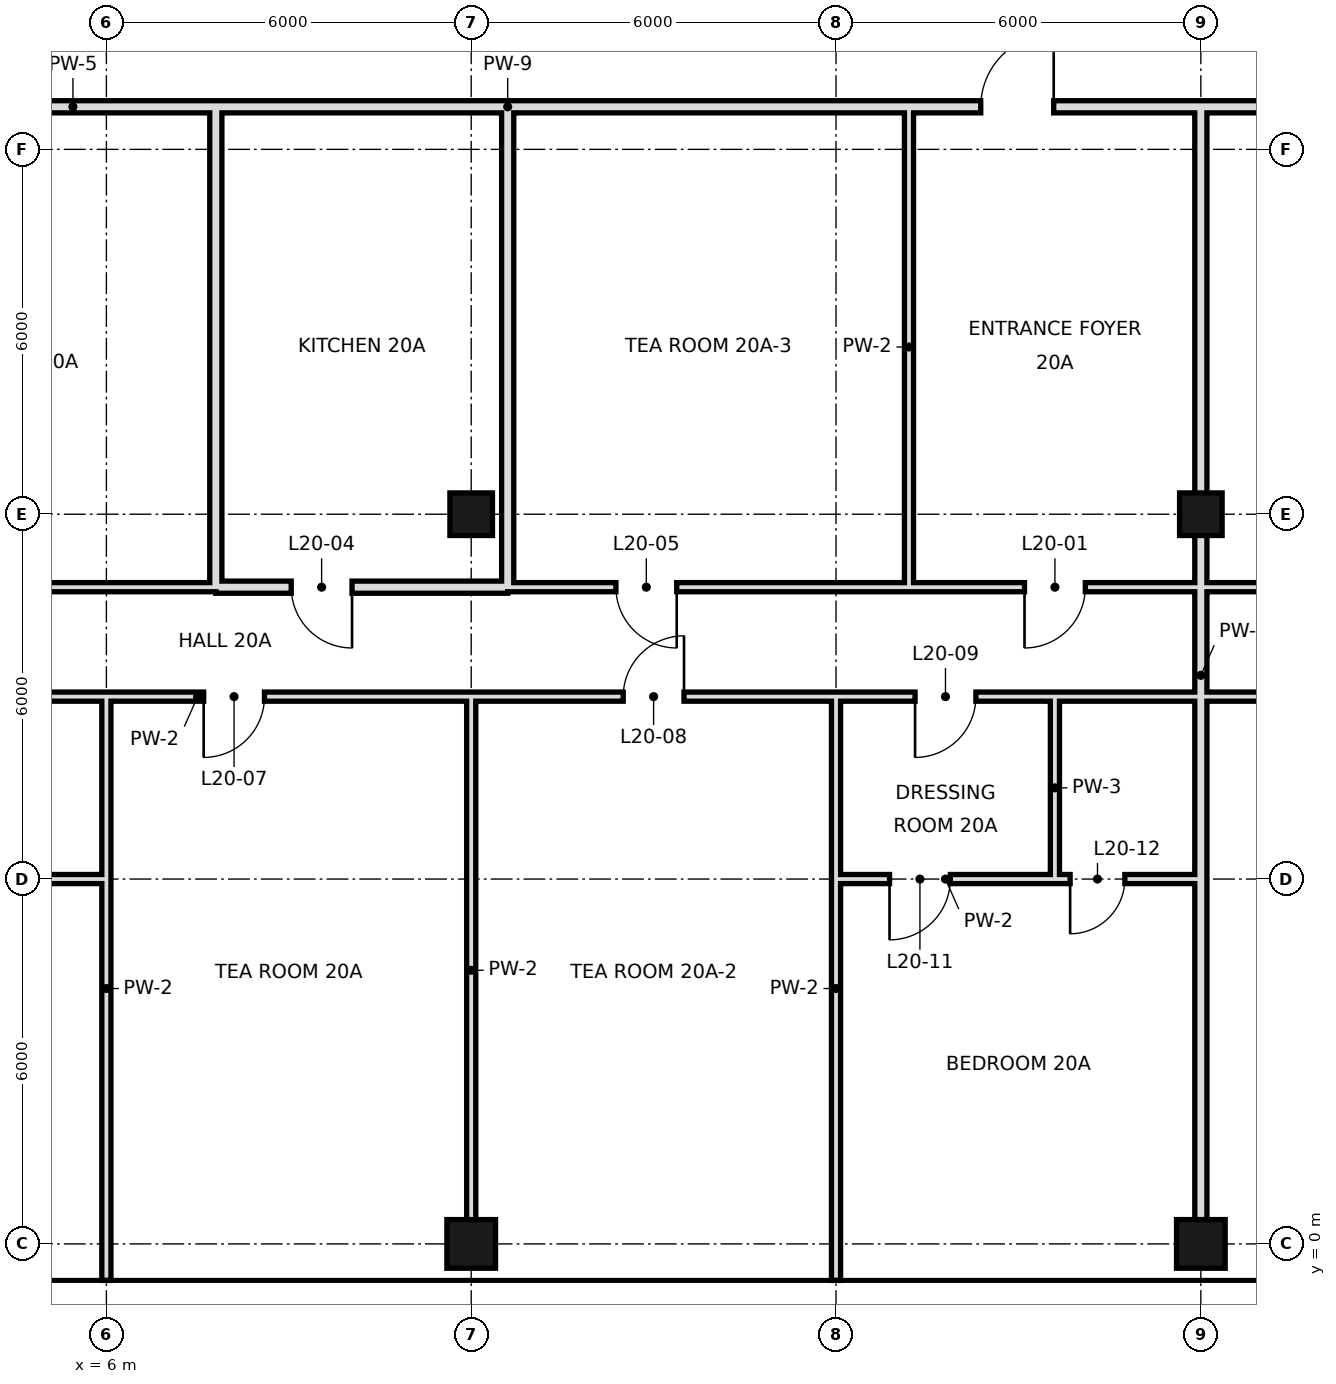
"""IFC4 building model, lengths in metres.
Left out: names, types, materials, properties, quantities, classifications, styles, units other than length and angle.
Written with IfcOpenShell. Run it as: python <this file> out.ifc"""

import sys

from ifc_helpers import new_model, si_unit, direction, frame, frame_2d, origin, origin_2d, place, context, subcontext, project, spatial, rectangle, hollow_rectangle, extrude, element, fill, save


model = new_model("IFC4")
c1 = context("Model", 3, precision=1e-05, world=origin(), true_north=direction((0.0, 1.0)))
c2 = subcontext(c1, "Body", "Model", "MODEL_VIEW")
j1 = project(units=[si_unit("LENGTHUNIT", "METRE"), si_unit("PLANEANGLEUNIT", "RADIAN")], contexts=[c1])
p1 = place(None, origin())
s1 = spatial("IfcSite", under=j1, at=p1, CompositionType="ELEMENT")
p2 = place(p1, origin())
s2 = spatial("IfcBuilding", under=s1, at=p2, CompositionType="ELEMENT")
p3 = place(p2, frame((0.0, 0.0, 96.2)))
s3 = spatial("IfcBuildingStorey", under=s2, at=p3, CompositionType="ELEMENT", Elevation=96.2)
p4 = place(p3, frame((12.0, 0.0, 0.0), z_axis=(0.0, 0.0, 1.0), x_axis=(1.0, 0.0, 0.0)))
e1 = element("IfcColumn", 1, at=p4, inside=s3, PredefinedType="COLUMN", context=c2, shape_type="SweptSolid", body=[
    extrude(hollow_rectangle(XDim=0.8, YDim=0.8, WallThickness=0.04, at=origin_2d()), origin(), (0.0, 0.0, 1.0), 3.6),
])
p5 = place(p3, frame((12.0, 12.0, 0.0), z_axis=(0.0, 0.0, 1.0), x_axis=(1.0, 0.0, 0.0)))
e2 = element("IfcColumn", 2, at=p5, inside=s3, PredefinedType="COLUMN", context=c2, shape_type="SweptSolid", body=[
    extrude(hollow_rectangle(XDim=0.7, YDim=0.7, WallThickness=0.036, at=origin_2d()), origin(), (0.0, 0.0, 1.0), 3.6),
])
p6 = place(p3, frame((24.0, 0.0, 0.0), z_axis=(0.0, 0.0, 1.0), x_axis=(1.0, 0.0, 0.0)))
e3 = element("IfcColumn", 3, at=p6, inside=s3, PredefinedType="COLUMN", context=c2, shape_type="SweptSolid", body=[
    extrude(hollow_rectangle(XDim=0.8, YDim=0.8, WallThickness=0.04, at=origin_2d()), origin(), (0.0, 0.0, 1.0), 3.6),
])
p7 = place(p3, frame((24.0, 12.0, 0.0), z_axis=(0.0, 0.0, 1.0), x_axis=(1.0, 0.0, 0.0)))
e4 = element("IfcColumn", 4, at=p7, inside=s3, PredefinedType="COLUMN", context=c2, shape_type="SweptSolid", body=[
    extrude(hollow_rectangle(XDim=0.7, YDim=0.7, WallThickness=0.036, at=origin_2d()), origin(), (0.0, 0.0, 1.0), 3.6),
])
p8 = place(p3, frame((12.0, 0.0, 0.0), z_axis=(0.0, 0.0, 1.0), x_axis=(0.0, 1.0, 0.0)))
e5 = element("IfcWall", 5, at=p8, inside=s3, PredefinedType="PARTITIONING", context=c2, shape_type="SweptSolid", body=[
    extrude(rectangle(XDim=9.0, YDim=0.15, at=frame_2d((4.5, 0.0))), origin(), (0.0, 0.0, 1.0), 2.72),
])
p9 = place(p3, frame((12.6, 10.8, 0.0), z_axis=(0.0, 0.0, 1.0), x_axis=(0.0, 1.0, 0.0)))
e6 = element("IfcWall", 6, at=p9, inside=s3, PredefinedType="SOLIDWALL", context=c2, shape_type="SweptSolid", body=[
    extrude(rectangle(XDim=7.9, YDim=0.2, at=frame_2d((3.95, 0.0))), origin(), (0.0, 0.0, 1.0), 2.72),
])
p10 = place(p3, frame((18.0, -0.6, 0.0), z_axis=(0.0, 0.0, 1.0), x_axis=(0.0, 1.0, 0.0)))
e7 = element("IfcWall", 7, at=p10, inside=s3, PredefinedType="PARTITIONING", context=c2, shape_type="SweptSolid", body=[
    extrude(rectangle(XDim=9.6, YDim=0.15, at=frame_2d((4.8, 0.0))), origin(), (0.0, 0.0, 1.0), 2.72),
])
p11 = place(p3, frame((19.2, 10.8, 0.0), z_axis=(0.0, 0.0, 1.0), x_axis=(0.0, 1.0, 0.0)))
e8 = element("IfcWall", 8, at=p11, inside=s3, PredefinedType="PARTITIONING", context=c2, shape_type="SweptSolid", body=[
    extrude(rectangle(XDim=7.9, YDim=0.15, at=frame_2d((3.95, 0.0))), origin(), (0.0, 0.0, 1.0), 3.42),
])
p12 = place(p3, frame((21.6, 6.0, 0.0), z_axis=(0.0, 0.0, 1.0), x_axis=(0.0, 1.0, 0.0)))
e9 = element("IfcWall", 9, at=p12, inside=s3, PredefinedType="PARTITIONING", context=c2, shape_type="SweptSolid", body=[
    extrude(rectangle(XDim=3.0, YDim=0.15, at=frame_2d((1.5, 0.0))), origin(), (0.0, 0.0, 1.0), 3.42),
])
p13 = place(p3, frame((24.0, 0.0, 0.0), z_axis=(0.0, 0.0, 1.0), x_axis=(0.0, 1.0, 0.0)))
e10 = element("IfcWall", 10, at=p13, inside=s3, PredefinedType="SOLIDWALL", context=c2, shape_type="SweptSolid", body=[
    extrude(rectangle(XDim=18.7, YDim=0.2, at=frame_2d((9.35, 0.0))), origin(), (0.0, 0.0, 1.0), 2.72),
])
p14 = place(p3, frame((6.0, -0.6, 0.0), z_axis=(0.0, 0.0, 1.0), x_axis=(0.0, 1.0, 0.0)))
e11 = element("IfcWall", 11, at=p14, inside=s3, PredefinedType="PARTITIONING", context=c2, shape_type="SweptSolid", body=[
    extrude(rectangle(XDim=9.6, YDim=0.15, at=frame_2d((4.8, 0.0))), origin(), (0.0, 0.0, 1.0), 2.72),
])
p15 = place(p3, frame((7.8, 10.8, 0.0), z_axis=(0.0, 0.0, 1.0), x_axis=(0.0, 1.0, 0.0)))
e12 = element("IfcWall", 12, at=p15, inside=s3, PredefinedType="SOLIDWALL", context=c2, shape_type="SweptSolid", body=[
    extrude(rectangle(XDim=7.9, YDim=0.2, at=frame_2d((3.95, 0.0))), origin(), (0.0, 0.0, 1.0), 2.72),
])
p16 = place(p3, frame((7.8, 10.8, 0.0), z_axis=(0.0, 0.0, 1.0), x_axis=(1.0, 0.0, 0.0)))
e13 = element("IfcWall", 13, at=p16, inside=s3, PredefinedType="SOLIDWALL", context=c2, shape_type="SweptSolid", body=[
    extrude(rectangle(XDim=4.8, YDim=0.2, at=frame_2d((2.4, 0.0))), origin(), (0.0, 0.0, 1.0), 2.72),
])
p17 = place(p16, frame((1.24, 0.0, 0.0)))
e14 = element("IfcOpeningElement", 14, at=p17, cuts=e13, PredefinedType="OPENING", context=c2, shape_type="SweptSolid", body=[
    extrude(rectangle(XDim=1.0, YDim=2.4, at=frame_2d((0.5, 1.2))), frame((0.0, 0.11, 0.0), z_axis=(0.0, -1.0, 0.0), x_axis=(1.0, 0.0, 0.0)), (0.0, 0.0, 1.0), 0.22),
])
p18 = place(p3, frame((-3.6, 10.8, 0.0), z_axis=(0.0, 0.0, 1.0), x_axis=(1.0, 0.0, 0.0)))
e15 = element("IfcWall", 15, at=p18, inside=s3, PredefinedType="PARTITIONING", context=c2, shape_type="SweptSolid", body=[
    extrude(rectangle(XDim=11.4, YDim=0.15, at=frame_2d((5.7, 0.0))), origin(), (0.0, 0.0, 1.0), 3.42),
])
p19 = place(p18, frame((7.18, 0.0, 0.0)))
e16 = element("IfcOpeningElement", 16, at=p19, cuts=e15, PredefinedType="OPENING", context=c2, shape_type="SweptSolid", body=[
    extrude(rectangle(XDim=1.0, YDim=2.4, at=frame_2d((0.5, 1.2))), frame((0.0, 0.085, 0.0), z_axis=(0.0, -1.0, 0.0), x_axis=(1.0, 0.0, 0.0)), (0.0, 0.0, 1.0), 0.17),
])
p20 = place(p3, frame((12.6, 10.8, 0.0), z_axis=(0.0, 0.0, 1.0), x_axis=(1.0, 0.0, 0.0)))
e17 = element("IfcWall", 17, at=p20, inside=s3, PredefinedType="PARTITIONING", context=c2, shape_type="SweptSolid", body=[
    extrude(rectangle(XDim=40.2, YDim=0.15, at=frame_2d((20.1, 0.0))), origin(), (0.0, 0.0, 1.0), 3.42),
])
p21 = place(p20, frame((8.5, 0.0, 0.0)))
e18 = element("IfcOpeningElement", 18, at=p21, cuts=e17, PredefinedType="OPENING", context=c2, shape_type="SweptSolid", body=[
    extrude(rectangle(XDim=1.0, YDim=2.4, at=frame_2d((0.5, 1.2))), frame((0.0, 0.085, 0.0), z_axis=(0.0, -1.0, 0.0), x_axis=(1.0, 0.0, 0.0)), (0.0, 0.0, 1.0), 0.17),
])
p22 = place(p20, frame((1.78, 0.0, 0.0)))
e19 = element("IfcOpeningElement", 19, at=p22, cuts=e17, PredefinedType="OPENING", context=c2, shape_type="SweptSolid", body=[
    extrude(rectangle(XDim=1.0, YDim=2.4, at=frame_2d((0.5, 1.2))), frame((0.0, 0.085, 0.0), z_axis=(0.0, -1.0, 0.0), x_axis=(1.0, 0.0, 0.0)), (0.0, 0.0, 1.0), 0.17),
])
p23 = place(p20, frame((23.8, 0.0, 0.0)))
e20 = element("IfcOpeningElement", 20, at=p23, cuts=e17, PredefinedType="OPENING", context=c2, shape_type="SweptSolid", body=[
    extrude(rectangle(XDim=1.0, YDim=2.4, at=frame_2d((0.5, 1.2))), frame((0.0, 0.085, 0.0), z_axis=(0.0, -1.0, 0.0), x_axis=(1.0, 0.0, 0.0)), (0.0, 0.0, 1.0), 0.17),
])
p24 = place(p20, frame((16.3, 0.0, 0.0)))
e21 = element("IfcOpeningElement", 21, at=p24, cuts=e17, PredefinedType="OPENING", context=c2, shape_type="SweptSolid", body=[
    extrude(rectangle(XDim=1.0, YDim=2.4, at=frame_2d((0.5, 1.2))), frame((0.0, 0.085, 0.0), z_axis=(0.0, -1.0, 0.0), x_axis=(1.0, 0.0, 0.0)), (0.0, 0.0, 1.0), 0.17),
])
p25 = place(p20, frame((33.7, 0.0, 0.0)))
e22 = element("IfcOpeningElement", 22, at=p25, cuts=e17, PredefinedType="OPENING", context=c2, shape_type="SweptSolid", body=[
    extrude(rectangle(XDim=1.0, YDim=2.4, at=frame_2d((0.5, 1.2))), frame((0.0, 0.085, 0.0), z_axis=(0.0, -1.0, 0.0), x_axis=(1.0, 0.0, 0.0)), (0.0, 0.0, 1.0), 0.17),
])
p26 = place(p3, frame((3.1, 18.7, 0.0), z_axis=(0.0, 0.0, 1.0), x_axis=(1.0, 0.0, 0.0)))
e23 = element("IfcWall", 23, at=p26, inside=s3, PredefinedType="SOLIDWALL", context=c2, shape_type="SweptSolid", body=[
    extrude(rectangle(XDim=4.7, YDim=0.2, at=frame_2d((2.35, 0.0))), origin(), (0.0, 0.0, 1.0), 2.72),
])
p27 = place(p3, frame((12.6, 18.7, 0.0), z_axis=(0.0, 0.0, 1.0), x_axis=(1.0, 0.0, 0.0)))
e24 = element("IfcWall", 24, at=p27, inside=s3, PredefinedType="SOLIDWALL", context=c2, shape_type="SweptSolid", body=[
    extrude(rectangle(XDim=32.3, YDim=0.2, at=frame_2d((16.15, 0.0))), origin(), (0.0, 0.0, 1.0), 2.72),
])
p28 = place(p27, frame((7.78, 0.0, 0.0)))
e25 = element("IfcOpeningElement", 25, at=p28, cuts=e24, PredefinedType="OPENING", context=c2, shape_type="SweptSolid", body=[
    extrude(rectangle(XDim=1.2, YDim=2.4, at=frame_2d((0.6, 1.2))), frame((0.0, 0.11, 0.0), z_axis=(0.0, -1.0, 0.0), x_axis=(1.0, 0.0, 0.0)), (0.0, 0.0, 1.0), 0.22),
])
p29 = place(p27, frame((24.6, 0.0, 0.0)))
e26 = element("IfcOpeningElement", 26, at=p29, cuts=e24, PredefinedType="OPENING", context=c2, shape_type="SweptSolid", body=[
    extrude(rectangle(XDim=1.2, YDim=2.4, at=frame_2d((0.6, 1.2))), frame((0.0, 0.11, 0.0), z_axis=(0.0, -1.0, 0.0), x_axis=(1.0, 0.0, 0.0)), (0.0, 0.0, 1.0), 0.22),
])
p30 = place(p3, frame((7.8, 18.7, 0.0), z_axis=(0.0, 0.0, 1.0), x_axis=(1.0, 0.0, 0.0)))
e27 = element("IfcWall", 27, at=p30, inside=s3, PredefinedType="SOLIDWALL", context=c2, shape_type="SweptSolid", body=[
    extrude(rectangle(XDim=4.8, YDim=0.2, at=frame_2d((2.4, 0.0))), origin(), (0.0, 0.0, 1.0), 3.42),
])
p31 = place(p3, frame((-6.0, 6.0, 0.0), z_axis=(0.0, 0.0, 1.0), x_axis=(1.0, 0.0, 0.0)))
e28 = element("IfcWall", 28, at=p31, inside=s3, PredefinedType="PARTITIONING", context=c2, shape_type="SweptSolid", body=[
    extrude(rectangle(XDim=12.0, YDim=0.15, at=frame_2d((6.0, 0.0))), origin(), (0.0, 0.0, 1.0), 2.97),
])
p32 = place(p31, frame((5.1, 0.0, 0.0)))
e29 = element("IfcOpeningElement", 29, at=p32, cuts=e28, PredefinedType="OPENING", context=c2, shape_type="SweptSolid", body=[
    extrude(rectangle(XDim=1.8, YDim=2.4, at=frame_2d((0.9, 1.2))), frame((0.0, 0.085, 0.0), z_axis=(0.0, -1.0, 0.0), x_axis=(1.0, 0.0, 0.0)), (0.0, 0.0, 1.0), 0.17),
])
p33 = place(p3, frame((18.0, 6.0, 0.0), z_axis=(0.0, 0.0, 1.0), x_axis=(1.0, 0.0, 0.0)))
e30 = element("IfcWall", 30, at=p33, inside=s3, PredefinedType="PARTITIONING", context=c2, shape_type="SweptSolid", body=[
    extrude(rectangle(XDim=3.6, YDim=0.15, at=frame_2d((1.8, 0.0))), origin(), (0.0, 0.0, 1.0), 2.97),
])
p34 = place(p33, frame((0.88, 0.0, 0.0)))
e31 = element("IfcOpeningElement", 31, at=p34, cuts=e30, PredefinedType="OPENING", context=c2, shape_type="SweptSolid", body=[
    extrude(rectangle(XDim=1.0, YDim=2.4, at=frame_2d((0.5, 1.2))), frame((0.0, 0.085, 0.0), z_axis=(0.0, -1.0, 0.0), x_axis=(1.0, 0.0, 0.0)), (0.0, 0.0, 1.0), 0.17),
])
p35 = place(p3, frame((21.6, 6.0, 0.0), z_axis=(0.0, 0.0, 1.0), x_axis=(1.0, 0.0, 0.0)))
e32 = element("IfcWall", 32, at=p35, inside=s3, PredefinedType="PARTITIONING", context=c2, shape_type="SweptSolid", body=[
    extrude(rectangle(XDim=2.4, YDim=0.15, at=frame_2d((1.2, 0.0))), origin(), (0.0, 0.0, 1.0), 2.97),
])
p36 = place(p35, frame((0.25, 0.0, 0.0)))
e33 = element("IfcOpeningElement", 33, at=p36, cuts=e32, PredefinedType="OPENING", context=c2, shape_type="SweptSolid", body=[
    extrude(rectangle(XDim=0.9, YDim=2.4, at=frame_2d((0.45, 1.2))), frame((0.0, 0.085, 0.0), z_axis=(0.0, -1.0, 0.0), x_axis=(1.0, 0.0, 0.0)), (0.0, 0.0, 1.0), 0.17),
])
p37 = place(p3, frame((-6.6, 9.0, 0.0), z_axis=(0.0, 0.0, 1.0), x_axis=(1.0, 0.0, 0.0)))
e34 = element("IfcWall", 34, at=p37, inside=s3, PredefinedType="PARTITIONING", context=c2, shape_type="SweptSolid", body=[
    extrude(rectangle(XDim=28.2, YDim=0.15, at=frame_2d((14.1, 0.0))), origin(), (0.0, 0.0, 1.0), 3.42),
])
p38 = place(p37, frame((7.64, 0.0, 0.0)))
e35 = element("IfcOpeningElement", 35, at=p38, cuts=e34, PredefinedType="OPENING", context=c2, shape_type="SweptSolid", body=[
    extrude(rectangle(XDim=1.8, YDim=2.4, at=frame_2d((0.9, 1.2))), frame((0.0, 0.085, 0.0), z_axis=(0.0, -1.0, 0.0), x_axis=(1.0, 0.0, 0.0)), (0.0, 0.0, 1.0), 0.17),
])
p39 = place(p37, frame((14.2, 0.0, 0.0)))
e36 = element("IfcOpeningElement", 36, at=p39, cuts=e34, PredefinedType="OPENING", context=c2, shape_type="SweptSolid", body=[
    extrude(rectangle(XDim=1.0, YDim=2.4, at=frame_2d((0.5, 1.2))), frame((0.0, 0.085, 0.0), z_axis=(0.0, -1.0, 0.0), x_axis=(1.0, 0.0, 0.0)), (0.0, 0.0, 1.0), 0.17),
])
p40 = place(p37, frame((21.1, 0.0, 0.0)))
e37 = element("IfcOpeningElement", 37, at=p40, cuts=e34, PredefinedType="OPENING", context=c2, shape_type="SweptSolid", body=[
    extrude(rectangle(XDim=1.0, YDim=2.4, at=frame_2d((0.5, 1.2))), frame((0.0, 0.085, 0.0), z_axis=(0.0, -1.0, 0.0), x_axis=(1.0, 0.0, 0.0)), (0.0, 0.0, 1.0), 0.17),
])
p41 = place(p37, frame((25.9, 0.0, 0.0)))
e38 = element("IfcOpeningElement", 38, at=p41, cuts=e34, PredefinedType="OPENING", context=c2, shape_type="SweptSolid", body=[
    extrude(rectangle(XDim=1.0, YDim=2.4, at=frame_2d((0.5, 1.2))), frame((0.0, 0.085, 0.0), z_axis=(0.0, -1.0, 0.0), x_axis=(1.0, 0.0, 0.0)), (0.0, 0.0, 1.0), 0.17),
])
p42 = place(p3, frame((24.0, 9.0, 0.0), z_axis=(0.0, 0.0, 1.0), x_axis=(1.0, 0.0, 0.0)))
e39 = element("IfcWall", 39, at=p42, inside=s3, PredefinedType="PARTITIONING", context=c2, shape_type="SweptSolid", body=[
    extrude(rectangle(XDim=18.0, YDim=0.15, at=frame_2d((9.0, 0.0))), origin(), (0.0, 0.0, 1.0), 3.42),
])
p43 = place(p42, frame((2.1, 0.0, 0.0)))
e40 = element("IfcOpeningElement", 40, at=p43, cuts=e39, PredefinedType="OPENING", context=c2, shape_type="SweptSolid", body=[
    extrude(rectangle(XDim=1.8, YDim=2.4, at=frame_2d((0.9, 1.2))), frame((0.0, 0.085, 0.0), z_axis=(0.0, -1.0, 0.0), x_axis=(1.0, 0.0, 0.0)), (0.0, 0.0, 1.0), 0.17),
])
p44 = place(p42, frame((9.16, 0.0, 0.0)))
e41 = element("IfcOpeningElement", 41, at=p44, cuts=e39, PredefinedType="OPENING", context=c2, shape_type="SweptSolid", body=[
    extrude(rectangle(XDim=1.8, YDim=2.4, at=frame_2d((0.9, 1.2))), frame((0.0, 0.085, 0.0), z_axis=(0.0, -1.0, 0.0), x_axis=(1.0, 0.0, 0.0)), (0.0, 0.0, 1.0), 0.17),
])
p45 = place(p3, frame((21.6, 9.0, 0.0), z_axis=(0.0, 0.0, 1.0), x_axis=(1.0, 0.0, 0.0)))
e42 = element("IfcWall", 42, at=p45, inside=s3, PredefinedType="PARTITIONING", context=c2, shape_type="SweptSolid", body=[
    extrude(rectangle(XDim=2.4, YDim=0.15, at=frame_2d((1.2, 0.0))), origin(), (0.0, 0.0, 1.0), 3.42),
])
p46 = place(p21, frame((1.0, 0.0, 0.0), z_axis=(0.0, 0.0, 1.0), x_axis=(-1.0, 0.0, 0.0)))
e43 = element("IfcDoor", 43, at=p46, inside=s3, OperationType="SINGLE_SWING_RIGHT", PredefinedType="DOOR", context=c2, shape_type="SweptSolid", body=[
    extrude(rectangle(XDim=1.0, YDim=2.4, at=frame_2d((0.5, 1.2))), frame((0.0, 0.025, 0.0), z_axis=(0.0, -1.0, 0.0), x_axis=(1.0, 0.0, 0.0)), (0.0, 0.0, 1.0), 0.05),
])
fill(e18, e43)
p47 = place(p17, origin())
e44 = element("IfcDoor", 44, at=p47, inside=s3, OperationType="SINGLE_SWING_RIGHT", PredefinedType="DOOR", context=c2, shape_type="SweptSolid", body=[
    extrude(rectangle(XDim=1.0, YDim=2.4, at=frame_2d((0.5, 1.2))), frame((0.0, 0.025, 0.0), z_axis=(0.0, -1.0, 0.0), x_axis=(1.0, 0.0, 0.0)), (0.0, 0.0, 1.0), 0.05),
])
fill(e14, e44)
p48 = place(p22, origin())
e45 = element("IfcDoor", 45, at=p48, inside=s3, OperationType="SINGLE_SWING_RIGHT", PredefinedType="DOOR", context=c2, shape_type="SweptSolid", body=[
    extrude(rectangle(XDim=1.0, YDim=2.4, at=frame_2d((0.5, 1.2))), frame((0.0, 0.025, 0.0), z_axis=(0.0, -1.0, 0.0), x_axis=(1.0, 0.0, 0.0)), (0.0, 0.0, 1.0), 0.05),
])
fill(e19, e45)
p49 = place(p39, frame((1.0, 0.0, 0.0), z_axis=(0.0, 0.0, 1.0), x_axis=(-1.0, 0.0, 0.0)))
e46 = element("IfcDoor", 46, at=p49, inside=s3, OperationType="SINGLE_SWING_RIGHT", PredefinedType="DOOR", context=c2, shape_type="SweptSolid", body=[
    extrude(rectangle(XDim=1.0, YDim=2.4, at=frame_2d((0.5, 1.2))), frame((0.0, 0.025, 0.0), z_axis=(0.0, -1.0, 0.0), x_axis=(1.0, 0.0, 0.0)), (0.0, 0.0, 1.0), 0.05),
])
fill(e36, e46)
p50 = place(p40, frame((1.0, 0.0, 0.0), z_axis=(0.0, 0.0, 1.0), x_axis=(-1.0, 0.0, 0.0)))
e47 = element("IfcDoor", 47, at=p50, inside=s3, OperationType="SINGLE_SWING_LEFT", PredefinedType="DOOR", context=c2, shape_type="SweptSolid", body=[
    extrude(rectangle(XDim=1.0, YDim=2.4, at=frame_2d((0.5, 1.2))), frame((0.0, 0.025, 0.0), z_axis=(0.0, -1.0, 0.0), x_axis=(1.0, 0.0, 0.0)), (0.0, 0.0, 1.0), 0.05),
])
fill(e37, e47)
p51 = place(p41, frame((1.0, 0.0, 0.0), z_axis=(0.0, 0.0, 1.0), x_axis=(-1.0, 0.0, 0.0)))
e48 = element("IfcDoor", 48, at=p51, inside=s3, OperationType="SINGLE_SWING_RIGHT", PredefinedType="DOOR", context=c2, shape_type="SweptSolid", body=[
    extrude(rectangle(XDim=1.0, YDim=2.4, at=frame_2d((0.5, 1.2))), frame((0.0, 0.025, 0.0), z_axis=(0.0, -1.0, 0.0), x_axis=(1.0, 0.0, 0.0)), (0.0, 0.0, 1.0), 0.05),
])
fill(e38, e48)
p52 = place(p34, frame((1.0, 0.0, 0.0), z_axis=(0.0, 0.0, 1.0), x_axis=(-1.0, 0.0, 0.0)))
e49 = element("IfcDoor", 49, at=p52, inside=s3, OperationType="SINGLE_SWING_RIGHT", PredefinedType="DOOR", context=c2, shape_type="SweptSolid", body=[
    extrude(rectangle(XDim=1.0, YDim=2.4, at=frame_2d((0.5, 1.2))), frame((0.0, 0.025, 0.0), z_axis=(0.0, -1.0, 0.0), x_axis=(1.0, 0.0, 0.0)), (0.0, 0.0, 1.0), 0.05),
])
fill(e31, e49)
p53 = place(p36, frame((0.9, 0.0, 0.0), z_axis=(0.0, 0.0, 1.0), x_axis=(-1.0, 0.0, 0.0)))
e50 = element("IfcDoor", 50, at=p53, inside=s3, OperationType="SINGLE_SWING_RIGHT", PredefinedType="DOOR", context=c2, shape_type="SweptSolid", body=[
    extrude(rectangle(XDim=0.9, YDim=2.4, at=frame_2d((0.45, 1.2))), frame((0.0, 0.025, 0.0), z_axis=(0.0, -1.0, 0.0), x_axis=(1.0, 0.0, 0.0)), (0.0, 0.0, 1.0), 0.05),
])
fill(e33, e50)
p54 = place(p28, frame((1.2, 0.0, 0.0), z_axis=(0.0, 0.0, 1.0), x_axis=(-1.0, 0.0, 0.0)))
e51 = element("IfcDoor", 51, at=p54, inside=s3, OperationType="SINGLE_SWING_LEFT", PredefinedType="DOOR", context=c2, shape_type="SweptSolid", body=[
    extrude(rectangle(XDim=1.2, YDim=2.4, at=frame_2d((0.6, 1.2))), frame((0.0, 0.025, 0.0), z_axis=(0.0, -1.0, 0.0), x_axis=(1.0, 0.0, 0.0)), (0.0, 0.0, 1.0), 0.05),
])
fill(e25, e51)
save(model, sys.argv[1])
